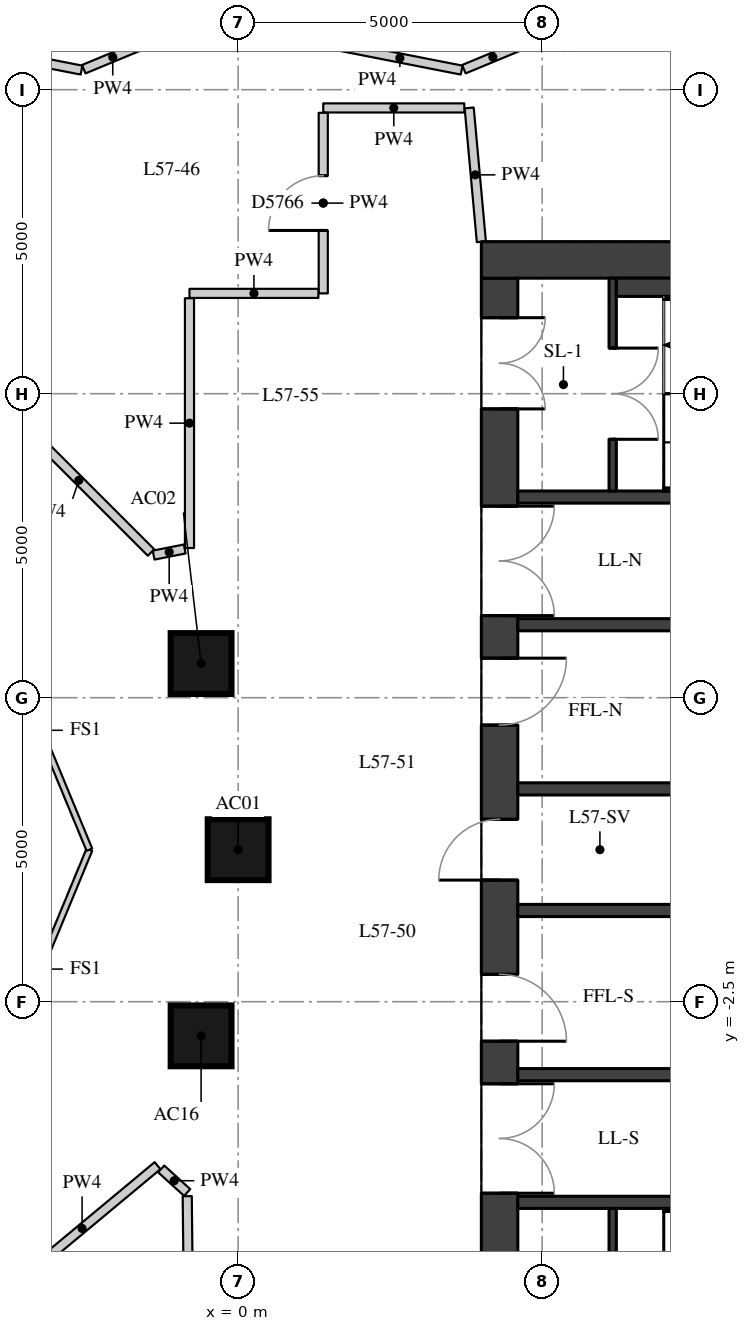
"""IFC4 building model, lengths in metres.
Left out: names, types, materials, properties, quantities, classifications, styles, units other than length and angle.
Written with IfcOpenShell. Run it as: python <this file> out.ifc"""

import sys

from ifc_helpers import new_model, si_unit, direction, frame, frame_2d, origin, origin_2d, place, context, subcontext, project, spatial, rectangle, extrude, element, fill, save


model = new_model("IFC4")
c1 = context("Model", 3, precision=1e-05, world=origin(), true_north=direction((0.0, 1.0)))
c2 = subcontext(c1, "Body", "Model", "MODEL_VIEW")
j1 = project(units=[si_unit("LENGTHUNIT", "METRE"), si_unit("PLANEANGLEUNIT", "RADIAN")], contexts=[c1])
p1 = place(None, origin())
s1 = spatial("IfcSite", under=j1, at=p1, CompositionType="ELEMENT")
p2 = place(p1, origin())
s2 = spatial("IfcBuilding", under=s1, at=p2, CompositionType="ELEMENT")
p3 = place(p2, frame((0.0, 0.0, 202.4)))
s3 = spatial("IfcBuildingStorey", under=s2, at=p3, CompositionType="ELEMENT", Elevation=202.4)
for number, where, z_axis, x_axis in (
    (1, (0.0, 0.0, 0.0), (0.0, 0.0, 1.0), (1.0, 0.0, 0.0)),
    (2, (-0.609, 3.062, 0.0), (0.0, 0.0, 1.0), (1.0, 0.0, 0.0)),
    (3, (-0.609, -3.062, 0.0), (0.0, 0.0, 1.0), (1.0, 0.0, 0.0)),
):
    element("IfcColumn", number, at=place(p3, frame(where, z_axis=z_axis, x_axis=x_axis)), inside=s3, PredefinedType="COLUMN", context=c2, shape_type="SweptSolid", body=[
        extrude(rectangle(XDim=1.0, YDim=1.0, at=origin_2d()), origin(), (0.0, 0.0, 1.0), 3.3),
    ])
p4 = place(p3, frame((4.3, -9.4, 0.0), z_axis=(0.0, 0.0, 1.0), x_axis=(0.0, 1.0, 0.0)))
e4 = element("IfcWall", 4, at=p4, inside=s3, PredefinedType="SHEAR", context=c2, shape_type="SweptSolid", body=[
    extrude(rectangle(XDim=18.8, YDim=0.6, at=frame_2d((9.4, 0.0))), origin(), (0.0, 0.0, 1.0), 3.02),
])
p5 = place(p4, frame((0.65, 0.0, 0.0)))
e5 = element("IfcOpeningElement", 5, at=p5, cuts=e4, PredefinedType="OPENING", context=c2, shape_type="SweptSolid", body=[
    extrude(rectangle(XDim=1.5, YDim=2.1, at=frame_2d((0.75, 1.05))), frame((0.0, 0.31, 0.0), z_axis=(0.0, -1.0, 0.0), x_axis=(1.0, 0.0, 0.0)), (0.0, 0.0, 1.0), 0.62),
])
p6 = place(p4, frame((3.75, 0.0, 0.0)))
e6 = element("IfcOpeningElement", 6, at=p6, cuts=e4, PredefinedType="OPENING", context=c2, shape_type="SweptSolid", body=[
    extrude(rectangle(XDim=1.8, YDim=2.1, at=frame_2d((0.9, 1.05))), frame((0.0, 0.31, 0.0), z_axis=(0.0, -1.0, 0.0), x_axis=(1.0, 0.0, 0.0)), (0.0, 0.0, 1.0), 0.62),
])
p7 = place(p4, frame((6.25, 0.0, 0.0)))
e7 = element("IfcOpeningElement", 7, at=p7, cuts=e4, PredefinedType="OPENING", context=c2, shape_type="SweptSolid", body=[
    extrude(rectangle(XDim=1.1, YDim=2.1, at=frame_2d((0.55, 1.05))), frame((0.0, 0.31, 0.0), z_axis=(0.0, -1.0, 0.0), x_axis=(1.0, 0.0, 0.0)), (0.0, 0.0, 1.0), 0.62),
])
p8 = place(p4, frame((8.9, 0.0, 0.0)))
e8 = element("IfcOpeningElement", 8, at=p8, cuts=e4, PredefinedType="OPENING", context=c2, shape_type="SweptSolid", body=[
    extrude(rectangle(XDim=1.0, YDim=2.1, at=frame_2d((0.5, 1.05))), frame((0.0, 0.31, 0.0), z_axis=(0.0, -1.0, 0.0), x_axis=(1.0, 0.0, 0.0)), (0.0, 0.0, 1.0), 0.62),
])
p9 = place(p4, frame((11.45, 0.0, 0.0)))
e9 = element("IfcOpeningElement", 9, at=p9, cuts=e4, PredefinedType="OPENING", context=c2, shape_type="SweptSolid", body=[
    extrude(rectangle(XDim=1.1, YDim=2.1, at=frame_2d((0.55, 1.05))), frame((0.0, 0.31, 0.0), z_axis=(0.0, -1.0, 0.0), x_axis=(1.0, 0.0, 0.0)), (0.0, 0.0, 1.0), 0.62),
])
p10 = place(p4, frame((13.25, 0.0, 0.0)))
e10 = element("IfcOpeningElement", 10, at=p10, cuts=e4, PredefinedType="OPENING", context=c2, shape_type="SweptSolid", body=[
    extrude(rectangle(XDim=1.8, YDim=2.1, at=frame_2d((0.9, 1.05))), frame((0.0, 0.31, 0.0), z_axis=(0.0, -1.0, 0.0), x_axis=(1.0, 0.0, 0.0)), (0.0, 0.0, 1.0), 0.62),
])
p11 = place(p4, frame((16.65, 0.0, 0.0)))
e11 = element("IfcOpeningElement", 11, at=p11, cuts=e4, PredefinedType="OPENING", context=c2, shape_type="SweptSolid", body=[
    extrude(rectangle(XDim=1.5, YDim=2.1, at=frame_2d((0.75, 1.05))), frame((0.0, 0.31, 0.0), z_axis=(0.0, -1.0, 0.0), x_axis=(1.0, 0.0, 0.0)), (0.0, 0.0, 1.0), 0.62),
])
p12 = place(p3, frame((4.0, 9.7, 0.0), z_axis=(0.0, 0.0, 1.0), x_axis=(1.0, 0.0, 0.0)))
e12 = element("IfcWall", 12, at=p12, inside=s3, PredefinedType="SHEAR", context=c2, shape_type="SweptSolid", body=[
    extrude(rectangle(XDim=12.0, YDim=0.6, at=frame_2d((6.0, 0.0))), origin(), (0.0, 0.0, 1.0), 3.02),
])
p13 = place(p3, frame((4.6, 5.8, 0.0), z_axis=(0.0, 0.0, 1.0), x_axis=(1.0, 0.0, 0.0)))
e13 = element("IfcWall", 13, at=p13, inside=s3, PredefinedType="SHEAR", context=c2, shape_type="SweptSolid", body=[
    extrude(rectangle(XDim=10.8, YDim=0.2, at=frame_2d((5.4, 0.0))), origin(), (0.0, 0.0, 1.0), 3.02),
])
p14 = place(p13, frame((7.05, 0.0, 0.0)))
e14 = element("IfcOpeningElement", 14, at=p14, cuts=e13, PredefinedType="OPENING", context=c2, shape_type="SweptSolid", body=[
    extrude(rectangle(XDim=1.1, YDim=2.1, at=frame_2d((0.55, 1.05))), frame((0.0, 0.11, 0.0), z_axis=(0.0, -1.0, 0.0), x_axis=(1.0, 0.0, 0.0)), (0.0, 0.0, 1.0), 0.22),
])
p15 = place(p13, frame((9.05, 0.0, 0.0)))
e15 = element("IfcOpeningElement", 15, at=p15, cuts=e13, PredefinedType="OPENING", context=c2, shape_type="SweptSolid", body=[
    extrude(rectangle(XDim=1.1, YDim=2.1, at=frame_2d((0.55, 1.05))), frame((0.0, 0.11, 0.0), z_axis=(0.0, -1.0, 0.0), x_axis=(1.0, 0.0, 0.0)), (0.0, 0.0, 1.0), 0.22),
])
p16 = place(p3, frame((4.6, 3.7, 0.0), z_axis=(0.0, 0.0, 1.0), x_axis=(1.0, 0.0, 0.0)))
e16 = element("IfcWall", 16, at=p16, inside=s3, PredefinedType="SHEAR", context=c2, shape_type="SweptSolid", body=[
    extrude(rectangle(XDim=10.8, YDim=0.2, at=frame_2d((5.4, 0.0))), origin(), (0.0, 0.0, 1.0), 3.02),
])
p17 = place(p16, frame((6.6, 0.0, 0.0)))
e17 = element("IfcOpeningElement", 17, at=p17, cuts=e16, PredefinedType="OPENING", context=c2, shape_type="SweptSolid", body=[
    extrude(rectangle(XDim=1.1, YDim=2.1, at=frame_2d((0.55, 1.05))), frame((0.0, 0.11, 0.0), z_axis=(0.0, -1.0, 0.0), x_axis=(1.0, 0.0, 0.0)), (0.0, 0.0, 1.0), 0.22),
])
p18 = place(p16, frame((8.9, 0.0, 0.0)))
e18 = element("IfcOpeningElement", 18, at=p18, cuts=e16, PredefinedType="OPENING", context=c2, shape_type="SweptSolid", body=[
    extrude(rectangle(XDim=1.1, YDim=2.1, at=frame_2d((0.55, 1.05))), frame((0.0, 0.11, 0.0), z_axis=(0.0, -1.0, 0.0), x_axis=(1.0, 0.0, 0.0)), (0.0, 0.0, 1.0), 0.22),
])
for number, where, z_axis, x_axis in (
    (19, (4.6, 1.0, 0.0), (0.0, 0.0, 1.0), (1.0, 0.0, 0.0)),
    (20, (4.6, -1.0, 0.0), (0.0, 0.0, 1.0), (1.0, 0.0, 0.0)),
):
    element("IfcWall", number, at=place(p3, frame(where, z_axis=z_axis, x_axis=x_axis)), inside=s3, PredefinedType="SHEAR", context=c2, shape_type="SweptSolid", body=[
        extrude(rectangle(XDim=10.8, YDim=0.2, at=frame_2d((5.4, 0.0))), origin(), (0.0, 0.0, 1.0), 3.02),
    ])
p19 = place(p3, frame((4.6, -3.7, 0.0), z_axis=(0.0, 0.0, 1.0), x_axis=(1.0, 0.0, 0.0)))
e21 = element("IfcWall", 21, at=p19, inside=s3, PredefinedType="SHEAR", context=c2, shape_type="SweptSolid", body=[
    extrude(rectangle(XDim=10.8, YDim=0.2, at=frame_2d((5.4, 0.0))), origin(), (0.0, 0.0, 1.0), 3.02),
])
p20 = place(p19, frame((6.6, 0.0, 0.0)))
e22 = element("IfcOpeningElement", 22, at=p20, cuts=e21, PredefinedType="OPENING", context=c2, shape_type="SweptSolid", body=[
    extrude(rectangle(XDim=1.1, YDim=2.1, at=frame_2d((0.55, 1.05))), frame((0.0, 0.11, 0.0), z_axis=(0.0, -1.0, 0.0), x_axis=(1.0, 0.0, 0.0)), (0.0, 0.0, 1.0), 0.22),
])
p21 = place(p19, frame((8.9, 0.0, 0.0)))
e23 = element("IfcOpeningElement", 23, at=p21, cuts=e21, PredefinedType="OPENING", context=c2, shape_type="SweptSolid", body=[
    extrude(rectangle(XDim=1.1, YDim=2.1, at=frame_2d((0.55, 1.05))), frame((0.0, 0.11, 0.0), z_axis=(0.0, -1.0, 0.0), x_axis=(1.0, 0.0, 0.0)), (0.0, 0.0, 1.0), 0.22),
])
p22 = place(p3, frame((4.6, -5.8, 0.0), z_axis=(0.0, 0.0, 1.0), x_axis=(1.0, 0.0, 0.0)))
e24 = element("IfcWall", 24, at=p22, inside=s3, PredefinedType="SHEAR", context=c2, shape_type="SweptSolid", body=[
    extrude(rectangle(XDim=10.8, YDim=0.2, at=frame_2d((5.4, 0.0))), origin(), (0.0, 0.0, 1.0), 3.02),
])
p23 = place(p3, frame((6.16, 5.9, 0.0), z_axis=(0.0, 0.0, 1.0), x_axis=(0.0, 1.0, 0.0)))
e25 = element("IfcWall", 25, at=p23, inside=s3, PredefinedType="SHEAR", context=c2, shape_type="SweptSolid", body=[
    extrude(rectangle(XDim=3.5, YDim=0.12, at=frame_2d((1.75, 0.0))), origin(), (0.0, 0.0, 1.0), 3.02),
])
p24 = place(p23, frame((0.85, 0.0, 0.0)))
e26 = element("IfcOpeningElement", 26, at=p24, cuts=e25, PredefinedType="OPENING", context=c2, shape_type="SweptSolid", body=[
    extrude(rectangle(XDim=1.5, YDim=2.1, at=frame_2d((0.75, 1.05))), frame((0.0, 0.07, 0.0), z_axis=(0.0, -1.0, 0.0), x_axis=(1.0, 0.0, 0.0)), (0.0, 0.0, 1.0), 0.14),
])
p25 = place(p3, frame((6.16, -9.4, 0.0), z_axis=(0.0, 0.0, 1.0), x_axis=(0.0, 1.0, 0.0)))
e27 = element("IfcWall", 27, at=p25, inside=s3, PredefinedType="SHEAR", context=c2, shape_type="SweptSolid", body=[
    extrude(rectangle(XDim=3.5, YDim=0.12, at=frame_2d((1.75, 0.0))), origin(), (0.0, 0.0, 1.0), 3.02),
])
p26 = place(p25, frame((1.15, 0.0, 0.0)))
e28 = element("IfcOpeningElement", 28, at=p26, cuts=e27, PredefinedType="OPENING", context=c2, shape_type="SweptSolid", body=[
    extrude(rectangle(XDim=1.5, YDim=2.1, at=frame_2d((0.75, 1.05))), frame((0.0, 0.07, 0.0), z_axis=(0.0, -1.0, 0.0), x_axis=(1.0, 0.0, 0.0)), (0.0, 0.0, 1.0), 0.14),
])
p27 = place(p3, frame((6.22, 9.25, 0.0), z_axis=(0.0, 0.0, 1.0), x_axis=(1.0, 0.0, 0.0)))
e29 = element("IfcWall", 29, at=p27, inside=s3, PredefinedType="PARTITIONING", context=c2, shape_type="SweptSolid", body=[
    extrude(rectangle(XDim=4.88, YDim=0.3, at=frame_2d((2.44, 0.0))), origin(), (0.0, 0.0, 1.0), 3.02),
])
p28 = place(p3, frame((4.052, 16.323, 0.0), z_axis=(0.0, 0.0, 1.0), x_axis=(0.922513794011, -0.385964117322, 0.0)))
e30 = element("IfcWall", 30, at=p28, inside=s3, PredefinedType="PARTITIONING", context=c2, shape_type="SweptSolid", body=[
    extrude(rectangle(XDim=9.47, YDim=0.2, at=frame_2d((4.735, 0.0))), origin(), (0.0, 0.0, 1.0), 3.02),
])
p29 = place(p28, frame((8.186, 0.0, 0.0)))
e31 = element("IfcOpeningElement", 31, at=p29, cuts=e30, PredefinedType="OPENING", context=c2, shape_type="SweptSolid", body=[
    extrude(rectangle(XDim=0.9, YDim=2.1, at=frame_2d((0.45, 1.05))), frame((0.0, 0.11, 0.0), z_axis=(0.0, -1.0, 0.0), x_axis=(1.0, 0.0, 0.0)), (0.0, 0.0, 1.0), 0.22),
])
p30 = place(p28, frame((2.639, 0.0, 0.0)))
e32 = element("IfcOpeningElement", 32, at=p30, cuts=e30, PredefinedType="OPENING", context=c2, shape_type="SweptSolid", body=[
    extrude(rectangle(XDim=1.1, YDim=2.1, at=frame_2d((0.55, 1.05))), frame((0.0, 0.11, 0.0), z_axis=(0.0, -1.0, 0.0), x_axis=(1.0, 0.0, 0.0)), (0.0, 0.0, 1.0), 0.22),
])
p31 = place(p3, frame((4.0, 9.999, 0.0), z_axis=(0.0, 0.0, 1.0), x_axis=(-0.090475982725, 0.995898637689, 0.0)))
e33 = element("IfcWall", 33, at=p31, inside=s3, PredefinedType="PARTITIONING", context=c2, shape_type="SweptSolid", body=[
    extrude(rectangle(XDim=2.21, YDim=0.15, at=frame_2d((1.105, 0.0))), origin(), (0.0, 0.0, 1.0), 3.02),
])
p32 = place(p3, frame((3.72, 12.2, 0.0), z_axis=(0.0, 0.0, 1.0), x_axis=(-1.0, 0.0, 0.0)))
e34 = element("IfcWall", 34, at=p32, inside=s3, PredefinedType="PARTITIONING", context=c2, shape_type="SweptSolid", body=[
    extrude(rectangle(XDim=2.32, YDim=0.15, at=frame_2d((1.16, 0.0))), origin(), (0.0, 0.0, 1.0), 3.02),
])
p33 = place(p3, frame((1.4, 12.12, 0.0), z_axis=(0.0, 0.0, 1.0), x_axis=(0.0, -1.0, 0.0)))
e35 = element("IfcWall", 35, at=p33, inside=s3, PredefinedType="PARTITIONING", context=c2, shape_type="SweptSolid", body=[
    extrude(rectangle(XDim=2.97, YDim=0.15, at=frame_2d((1.485, 0.0))), origin(), (0.0, 0.0, 1.0), 3.02),
])
p34 = place(p33, frame((1.035, 0.0, 0.0)))
e36 = element("IfcOpeningElement", 36, at=p34, cuts=e35, PredefinedType="OPENING", context=c2, shape_type="SweptSolid", body=[
    extrude(rectangle(XDim=0.9, YDim=2.1, at=frame_2d((0.45, 1.05))), frame((0.0, 0.085, 0.0), z_axis=(0.0, -1.0, 0.0), x_axis=(1.0, 0.0, 0.0)), (0.0, 0.0, 1.0), 0.17),
])
p35 = place(p3, frame((1.32, 9.15, 0.0), z_axis=(0.0, 0.0, 1.0), x_axis=(-1.0, 0.0, 0.0)))
e37 = element("IfcWall", 37, at=p35, inside=s3, PredefinedType="PARTITIONING", context=c2, shape_type="SweptSolid", body=[
    extrude(rectangle(XDim=2.12, YDim=0.15, at=frame_2d((1.06, 0.0))), origin(), (0.0, 0.0, 1.0), 3.02),
])
p36 = place(p3, frame((-0.8, 9.07, 0.0), z_axis=(0.0, 0.0, 1.0), x_axis=(0.0, -1.0, 0.0)))
e38 = element("IfcWall", 38, at=p36, inside=s3, PredefinedType="PARTITIONING", context=c2, shape_type="SweptSolid", body=[
    extrude(rectangle(XDim=4.108, YDim=0.15, at=frame_2d((2.054, 0.0))), origin(), (0.0, 0.0, 1.0), 3.02),
])
p37 = place(p3, frame((-0.878, 4.946, 0.0), z_axis=(0.0, 0.0, 1.0), x_axis=(-0.981223514921, -0.192874087857, 0.0)))
e39 = element("IfcWall", 39, at=p37, inside=s3, PredefinedType="PARTITIONING", context=c2, shape_type="SweptSolid", body=[
    extrude(rectangle(XDim=0.521, YDim=0.15, at=frame_2d((0.261, 0.0))), origin(), (0.0, 0.0, 1.0), 3.02),
])
p38 = place(p3, frame((-1.432, 4.888, 0.0), z_axis=(0.0, 0.0, 1.0), x_axis=(-0.70714312975, 0.707070430754, 0.0)))
e40 = element("IfcWall", 40, at=p38, inside=s3, PredefinedType="PARTITIONING", context=c2, shape_type="SweptSolid", body=[
    extrude(rectangle(XDim=3.358, YDim=0.15, at=frame_2d((1.679, 0.0))), origin(), (0.0, 0.0, 1.0), 3.02),
])
p39 = place(p3, frame((-4.607, 13.22, 0.0), z_axis=(0.0, 0.0, 1.0), x_axis=(0.981304142817, -0.192463449234, 0.0)))
e41 = element("IfcWall", 41, at=p39, inside=s3, PredefinedType="PARTITIONING", context=c2, shape_type="SweptSolid", body=[
    extrude(rectangle(XDim=2.07, YDim=0.15, at=frame_2d((1.035, 0.0))), origin(), (0.0, 0.0, 1.0), 3.02),
])
p40 = place(p3, frame((-2.539, 12.837, 0.0), z_axis=(0.0, 0.0, 1.0), x_axis=(0.923768662954, 0.382950985565, 0.0)))
e42 = element("IfcWall", 42, at=p40, inside=s3, PredefinedType="PARTITIONING", context=c2, shape_type="SweptSolid", body=[
    extrude(rectangle(XDim=1.031, YDim=0.15, at=frame_2d((0.516, 0.0))), origin(), (0.0, 0.0, 1.0), 3.02),
])
p41 = place(p3, frame((1.644, 13.22, 0.0), z_axis=(0.0, 0.0, 1.0), x_axis=(0.981304142817, -0.192463449234, 0.0)))
e43 = element("IfcWall", 43, at=p41, inside=s3, PredefinedType="PARTITIONING", context=c2, shape_type="SweptSolid", body=[
    extrude(rectangle(XDim=2.07, YDim=0.15, at=frame_2d((1.035, 0.0))), origin(), (0.0, 0.0, 1.0), 3.02),
])
p42 = place(p3, frame((3.713, 12.837, 0.0), z_axis=(0.0, 0.0, 1.0), x_axis=(0.923768662954, 0.382950985565, 0.0)))
e44 = element("IfcWall", 44, at=p42, inside=s3, PredefinedType="PARTITIONING", context=c2, shape_type="SweptSolid", body=[
    extrude(rectangle(XDim=1.031, YDim=0.15, at=frame_2d((0.516, 0.0))), origin(), (0.0, 0.0, 1.0), 3.02),
])
p43 = place(p3, frame((5.128, 14.138, 0.0), z_axis=(0.0, 0.0, 1.0), x_axis=(0.922514397623, -0.385962674591, 0.0)))
e45 = element("IfcWall", 45, at=p43, inside=s3, PredefinedType="PARTITIONING", context=c2, shape_type="SweptSolid", body=[
    extrude(rectangle(XDim=7.216, YDim=0.15, at=frame_2d((3.608, 0.0))), origin(), (0.0, 0.0, 1.0), 3.02),
])
p44 = place(p3, frame((-3.807, -7.262, 0.0), z_axis=(0.0, 0.0, 1.0), x_axis=(0.768654933145, 0.639663656739, 0.0)))
e46 = element("IfcWall", 46, at=p44, inside=s3, PredefinedType="PARTITIONING", context=c2, shape_type="SweptSolid", body=[
    extrude(rectangle(XDim=3.229, YDim=0.15, at=frame_2d((1.615, 0.0))), origin(), (0.0, 0.0, 1.0), 3.02),
])
p45 = place(p3, frame((-1.266, -5.25, 0.0), z_axis=(0.0, 0.0, 1.0), x_axis=(0.740704364941, -0.671831112525, 0.0)))
e47 = element("IfcWall", 47, at=p45, inside=s3, PredefinedType="PARTITIONING", context=c2, shape_type="SweptSolid", body=[
    extrude(rectangle(XDim=0.578, YDim=0.15, at=frame_2d((0.289, 0.0))), origin(), (0.0, 0.0, 1.0), 3.02),
])
p46 = place(p3, frame((-0.837, -5.699, 0.0), z_axis=(0.0, 0.0, 1.0), x_axis=(0.010681337428, -0.999942952888, 0.0)))
e48 = element("IfcWall", 48, at=p46, inside=s3, PredefinedType="PARTITIONING", context=c2, shape_type="SweptSolid", body=[
    extrude(rectangle(XDim=3.451, YDim=0.15, at=frame_2d((1.726, 0.0))), origin(), (0.0, 0.0, 1.0), 3.02),
])
for number, where, z_axis, x_axis in (
    (49, (-2.446, 0.0, 0.0), (0.0, 0.0, 1.0), (-0.383, -0.924, 0.0)),
    (50, (-4.073, 3.927, 0.0), (0.0, 0.0, 1.0), (0.383, -0.924, 0.0)),
):
    element("IfcWall", number, at=place(p3, frame(where, z_axis=z_axis, x_axis=x_axis)), inside=s3, PredefinedType="PARTITIONING", context=c2, shape_type="SweptSolid", body=[
        extrude(rectangle(XDim=4.251, YDim=0.1, at=frame_2d((2.125, 0.0))), origin(), (0.0, 0.0, 1.0), 3.02),
    ])
p47 = place(p6, origin())
e51 = element("IfcDoor", 51, at=p47, inside=s3, OperationType="DOUBLE_DOOR_SINGLE_SWING", PredefinedType="DOOR", context=c2, shape_type="SweptSolid", body=[
    extrude(rectangle(XDim=1.8, YDim=2.1, at=frame_2d((0.9, 1.05))), frame((0.0, 0.025, 0.0), z_axis=(0.0, -1.0, 0.0), x_axis=(1.0, 0.0, 0.0)), (0.0, 0.0, 1.0), 0.05),
])
fill(e6, e51)
p48 = place(p7, origin())
e52 = element("IfcDoor", 52, at=p48, inside=s3, OperationType="SINGLE_SWING_RIGHT", PredefinedType="DOOR", context=c2, shape_type="SweptSolid", body=[
    extrude(rectangle(XDim=1.1, YDim=2.1, at=frame_2d((0.55, 1.05))), frame((0.0, 0.025, 0.0), z_axis=(0.0, -1.0, 0.0), x_axis=(1.0, 0.0, 0.0)), (0.0, 0.0, 1.0), 0.05),
])
fill(e7, e52)
p49 = place(p8, origin())
e53 = element("IfcDoor", 53, at=p49, inside=s3, OperationType="SINGLE_SWING_LEFT", PredefinedType="DOOR", context=c2, shape_type="SweptSolid", body=[
    extrude(rectangle(XDim=1.0, YDim=2.1, at=frame_2d((0.5, 1.05))), frame((0.0, 0.025, 0.0), z_axis=(0.0, -1.0, 0.0), x_axis=(1.0, 0.0, 0.0)), (0.0, 0.0, 1.0), 0.05),
])
fill(e8, e53)
p50 = place(p9, origin())
e54 = element("IfcDoor", 54, at=p50, inside=s3, OperationType="SINGLE_SWING_LEFT", PredefinedType="DOOR", context=c2, shape_type="SweptSolid", body=[
    extrude(rectangle(XDim=1.1, YDim=2.1, at=frame_2d((0.55, 1.05))), frame((0.0, 0.025, 0.0), z_axis=(0.0, -1.0, 0.0), x_axis=(1.0, 0.0, 0.0)), (0.0, 0.0, 1.0), 0.05),
])
fill(e9, e54)
p51 = place(p10, origin())
e55 = element("IfcDoor", 55, at=p51, inside=s3, OperationType="DOUBLE_DOOR_SINGLE_SWING", PredefinedType="DOOR", context=c2, shape_type="SweptSolid", body=[
    extrude(rectangle(XDim=1.8, YDim=2.1, at=frame_2d((0.9, 1.05))), frame((0.0, 0.025, 0.0), z_axis=(0.0, -1.0, 0.0), x_axis=(1.0, 0.0, 0.0)), (0.0, 0.0, 1.0), 0.05),
])
fill(e10, e55)
p52 = place(p11, origin())
e56 = element("IfcDoor", 56, at=p52, inside=s3, OperationType="DOUBLE_DOOR_SINGLE_SWING", PredefinedType="DOOR", context=c2, shape_type="SweptSolid", body=[
    extrude(rectangle(XDim=1.5, YDim=2.1, at=frame_2d((0.75, 1.05))), frame((0.0, 0.025, 0.0), z_axis=(0.0, -1.0, 0.0), x_axis=(1.0, 0.0, 0.0)), (0.0, 0.0, 1.0), 0.05),
])
fill(e11, e56)
p53 = place(p24, origin())
e57 = element("IfcDoor", 57, at=p53, inside=s3, OperationType="DOUBLE_DOOR_SINGLE_SWING", PredefinedType="DOOR", context=c2, shape_type="SweptSolid", body=[
    extrude(rectangle(XDim=1.5, YDim=2.1, at=frame_2d((0.75, 1.05))), frame((0.0, 0.025, 0.0), z_axis=(0.0, -1.0, 0.0), x_axis=(1.0, 0.0, 0.0)), (0.0, 0.0, 1.0), 0.05),
])
fill(e26, e57)
p54 = place(p34, origin())
e58 = element("IfcDoor", 58, at=p54, inside=s3, OperationType="SINGLE_SWING_LEFT", PredefinedType="DOOR", context=c2, shape_type="SweptSolid", body=[
    extrude(rectangle(XDim=0.9, YDim=2.1, at=frame_2d((0.45, 1.05))), frame((0.0, 0.025, 0.0), z_axis=(0.0, -1.0, 0.0), x_axis=(1.0, 0.0, 0.0)), (0.0, 0.0, 1.0), 0.05),
])
fill(e36, e58)
save(model, sys.argv[1])
